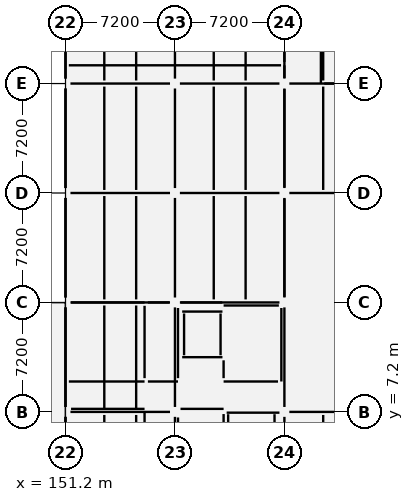
"""IFC4 building model, lengths in metres.
Left out: names, types, materials, properties, quantities, classifications, styles, units other than length and angle.
Written with IfcOpenShell. Run it as: python <this file> out.ifc"""

import sys

from ifc_helpers import new_model, si_unit, direction, frame, frame_2d, origin, origin_2d, place, context, subcontext, project, spatial, rectangle, extrude, element, fill, save


model = new_model("IFC4")
c1 = context("Model", 3, precision=1e-05, world=origin(), true_north=direction((0.0, 1.0)))
c2 = subcontext(c1, "Body", "Model", "MODEL_VIEW")
j1 = project(units=[si_unit("LENGTHUNIT", "METRE"), si_unit("PLANEANGLEUNIT", "RADIAN")], contexts=[c1])
p1 = place(None, origin())
s1 = spatial("IfcSite", under=j1, at=p1, CompositionType="ELEMENT")
p2 = place(p1, origin())
s2 = spatial("IfcBuilding", under=s1, at=p2, CompositionType="ELEMENT")
p3 = place(p2, frame((0.0, 0.0, 13.5)))
s3 = spatial("IfcBuildingStorey", under=s2, at=p3, CompositionType="ELEMENT", Elevation=13.5)
for number, where, z_axis, x_axis in (
    (1, (151.2, 7.2, 0.0), (0.0, 0.0, 1.0), (1.0, 0.0, 0.0)),
    (2, (151.2, 14.4, 0.0), (0.0, 0.0, 1.0), (1.0, 0.0, 0.0)),
    (3, (151.2, 21.6, 0.0), (0.0, 0.0, 1.0), (1.0, 0.0, 0.0)),
    (4, (151.2, 28.8, 0.0), (0.0, 0.0, 1.0), (1.0, 0.0, 0.0)),
    (5, (158.4, 7.2, 0.0), (0.0, 0.0, 1.0), (1.0, 0.0, 0.0)),
    (6, (158.4, 14.4, 0.0), (0.0, 0.0, 1.0), (1.0, 0.0, 0.0)),
    (7, (158.4, 21.6, 0.0), (0.0, 0.0, 1.0), (1.0, 0.0, 0.0)),
    (8, (158.4, 28.8, 0.0), (0.0, 0.0, 1.0), (1.0, 0.0, 0.0)),
    (9, (165.6, 7.2, 0.0), (0.0, 0.0, 1.0), (1.0, 0.0, 0.0)),
    (10, (165.6, 14.4, 0.0), (0.0, 0.0, 1.0), (1.0, 0.0, 0.0)),
    (11, (165.6, 21.6, 0.0), (0.0, 0.0, 1.0), (1.0, 0.0, 0.0)),
    (12, (165.6, 28.8, 0.0), (0.0, 0.0, 1.0), (1.0, 0.0, 0.0)),
):
    element("IfcColumn", number, at=place(p3, frame(where, z_axis=z_axis, x_axis=x_axis)), inside=s3, PredefinedType="COLUMN", context=c2, shape_type="SweptSolid", body=[
        extrude(rectangle(XDim=0.65, YDim=0.65, at=origin_2d()), origin(), (0.0, 0.0, 1.0), 3.9),
    ])
for number, where, z_axis, x_axis in (
    (13, (158.875, 10.8, 0.0), (0.0, 0.0, 1.0), (1.0, 0.0, 0.0)),
    (14, (158.875, 13.8, 0.0), (0.0, 0.0, 1.0), (1.0, 0.0, 0.0)),
):
    element("IfcWall", number, at=place(p3, frame(where, z_axis=z_axis, x_axis=x_axis)), inside=s3, PredefinedType="SHEAR", context=c2, shape_type="SweptSolid", body=[
        extrude(rectangle(XDim=2.65, YDim=0.25, at=frame_2d((1.325, 0.0))), origin(), (0.0, 0.0, 1.0), 3.62),
    ])
p4 = place(p3, frame((159.0, 10.925, 0.0), z_axis=(0.0, 0.0, 1.0), x_axis=(0.0, 1.0, 0.0)))
e15 = element("IfcWall", 15, at=p4, inside=s3, PredefinedType="SHEAR", context=c2, shape_type="SweptSolid", body=[
    extrude(rectangle(XDim=2.75, YDim=0.25, at=frame_2d((1.375, 0.0))), origin(), (0.0, 0.0, 1.0), 3.62),
])
p5 = place(p3, frame((161.4, 10.925, 0.0), z_axis=(0.0, 0.0, 1.0), x_axis=(0.0, 1.0, 0.0)))
e16 = element("IfcWall", 16, at=p5, inside=s3, PredefinedType="SHEAR", context=c2, shape_type="SweptSolid", body=[
    extrude(rectangle(XDim=2.75, YDim=0.25, at=frame_2d((1.375, 0.0))), origin(), (0.0, 0.0, 1.0), 3.62),
])
p6 = place(p5, frame((0.825, 0.0, 0.0)))
e17 = element("IfcOpeningElement", 17, at=p6, cuts=e16, PredefinedType="OPENING", context=c2, shape_type="SweptSolid", body=[
    extrude(rectangle(XDim=1.1, YDim=2.15, at=frame_2d((0.55, 1.075))), frame((0.0, 0.137, 0.0), z_axis=(0.0, -1.0, 0.0), x_axis=(1.0, 0.0, 0.0)), (0.0, 0.0, 1.0), 0.274),
])
p7 = place(p3, frame((161.8, 7.15, 0.0), z_axis=(0.0, 0.0, 1.0), x_axis=(1.0, 0.0, 0.0)))
e18 = element("IfcWall", 18, at=p7, inside=s3, PredefinedType="SHEAR", context=c2, shape_type="SweptSolid", body=[
    extrude(rectangle(XDim=3.475, YDim=0.2, at=frame_2d((1.737, 0.0))), origin(), (0.0, 0.0, 1.0), 3.62),
])
p8 = place(p7, frame((1.188, 0.0, 0.0)))
e19 = element("IfcOpeningElement", 19, at=p8, cuts=e18, PredefinedType="OPENING", context=c2, shape_type="SweptSolid", body=[
    extrude(rectangle(XDim=1.1, YDim=2.15, at=frame_2d((0.55, 1.075))), frame((0.0, 0.112, 0.0), z_axis=(0.0, -1.0, 0.0), x_axis=(1.0, 0.0, 0.0)), (0.0, 0.0, 1.0), 0.224),
])
for number, where, z_axis, x_axis in (
    (20, (161.9, 0.43, 0.0), (0.0, 0.0, 1.0), (0.0, 1.0, 0.0)),
    (21, (164.95, 0.43, 0.0), (0.0, 0.0, 1.0), (0.0, 1.0, 0.0)),
):
    element("IfcWall", number, at=place(p3, frame(where, z_axis=z_axis, x_axis=x_axis)), inside=s3, PredefinedType="SHEAR", context=c2, shape_type="SweptSolid", body=[
        extrude(rectangle(XDim=6.62, YDim=0.2, at=frame_2d((3.31, 0.0))), origin(), (0.0, 0.0, 1.0), 3.62),
    ])
p9 = place(p3, frame((151.2, 35.675, 0.0), z_axis=(0.0, 0.0, 1.0), x_axis=(0.0, -1.0, 0.0)))
e22 = element("IfcWall", 22, at=p9, inside=s3, PredefinedType="ELEMENTEDWALL", context=c2, shape_type="SweptSolid", body=[
    extrude(rectangle(XDim=6.55, YDim=0.28, at=frame_2d((3.275, 0.0))), origin(), (0.0, 0.0, 1.0), 2.96),
])
p10 = place(p3, frame((151.2, 28.475, 0.0), z_axis=(0.0, 0.0, 1.0), x_axis=(0.0, -1.0, 0.0)))
e23 = element("IfcWall", 23, at=p10, inside=s3, PredefinedType="ELEMENTEDWALL", context=c2, shape_type="SweptSolid", body=[
    extrude(rectangle(XDim=6.55, YDim=0.28, at=frame_2d((3.275, 0.0))), origin(), (0.0, 0.0, 1.0), 3.01),
])
p11 = place(p3, frame((151.2, 21.275, 0.0), z_axis=(0.0, 0.0, 1.0), x_axis=(0.0, -1.0, 0.0)))
e24 = element("IfcWall", 24, at=p11, inside=s3, PredefinedType="ELEMENTEDWALL", context=c2, shape_type="SweptSolid", body=[
    extrude(rectangle(XDim=6.55, YDim=0.28, at=frame_2d((3.275, 0.0))), origin(), (0.0, 0.0, 1.0), 2.96),
])
p12 = place(p3, frame((151.2, 14.075, 0.0), z_axis=(0.0, 0.0, 1.0), x_axis=(0.0, -1.0, 0.0)))
e25 = element("IfcWall", 25, at=p12, inside=s3, PredefinedType="ELEMENTEDWALL", context=c2, shape_type="SweptSolid", body=[
    extrude(rectangle(XDim=6.55, YDim=0.28, at=frame_2d((3.275, 0.0))), origin(), (0.0, 0.0, 1.0), 3.01),
])
p13 = place(p12, frame((2.525, 0.0, 0.0)))
e26 = element("IfcOpeningElement", 26, at=p13, cuts=e25, PredefinedType="OPENING", context=c2, shape_type="SweptSolid", body=[
    extrude(rectangle(XDim=1.5, YDim=2.2, at=frame_2d((0.75, 1.1))), frame((0.0, 0.152, 0.0), z_axis=(0.0, -1.0, 0.0), x_axis=(1.0, 0.0, 0.0)), (0.0, 0.0, 1.0), 0.304),
])
p14 = place(p3, frame((151.2, 6.875, 0.0), z_axis=(0.0, 0.0, 1.0), x_axis=(0.0, -1.0, 0.0)))
e27 = element("IfcWall", 27, at=p14, inside=s3, PredefinedType="ELEMENTEDWALL", context=c2, shape_type="SweptSolid", body=[
    extrude(rectangle(XDim=6.55, YDim=0.28, at=frame_2d((3.275, 0.0))), origin(), (0.0, 0.0, 1.0), 2.96),
])
p15 = place(p14, frame((2.575, 0.0, 0.85)))
e28 = element("IfcOpeningElement", 28, at=p15, cuts=e27, PredefinedType="OPENING", context=c2, shape_type="SweptSolid", body=[
    extrude(rectangle(XDim=1.4, YDim=1.65, at=frame_2d((0.7, 0.825))), frame((0.0, 0.152, 0.0), z_axis=(0.0, -1.0, 0.0), x_axis=(1.0, 0.0, 0.0)), (0.0, 0.0, 1.0), 0.304),
])
p16 = place(p3, frame((165.4, 9.2, 0.0), z_axis=(0.0, 0.0, 1.0), x_axis=(0.0, 1.0, 0.0)))
e29 = element("IfcWall", 29, at=p16, inside=s3, PredefinedType="STANDARD", context=c2, shape_type="SweptSolid", body=[
    extrude(rectangle(XDim=4.835, YDim=0.22, at=frame_2d((2.417, 0.0))), origin(), (0.0, 0.0, 1.0), 3.008),
])
p17 = place(p16, frame((1.817, 0.0, 0.0)))
e30 = element("IfcOpeningElement", 30, at=p17, cuts=e29, PredefinedType="OPENING", context=c2, shape_type="SweptSolid", body=[
    extrude(rectangle(XDim=1.2, YDim=2.2, at=frame_2d((0.6, 1.1))), frame((0.0, 0.122, 0.0), z_axis=(0.0, -1.0, 0.0), x_axis=(1.0, 0.0, 0.0)), (0.0, 0.0, 1.0), 0.244),
])
p18 = place(p3, frame((161.6, 9.2, 0.0), z_axis=(0.0, 0.0, 1.0), x_axis=(1.0, 0.0, 0.0)))
e31 = element("IfcWall", 31, at=p18, inside=s3, PredefinedType="STANDARD", context=c2, shape_type="SweptSolid", body=[
    extrude(rectangle(XDim=3.58, YDim=0.22, at=frame_2d((1.79, 0.0))), origin(), (0.0, 0.0, 1.0), 3.612),
])
p19 = place(p3, frame((161.6, 14.2, 0.0), z_axis=(0.0, 0.0, 1.0), x_axis=(1.0, 0.0, 0.0)))
e32 = element("IfcWall", 32, at=p19, inside=s3, PredefinedType="STANDARD", context=c2, shape_type="SweptSolid", body=[
    extrude(rectangle(XDim=3.635, YDim=0.22, at=frame_2d((1.817, 0.0))), origin(), (0.0, 0.0, 1.0), 2.908),
])
p20 = place(p3, frame((161.6, 9.42, 0.0), z_axis=(0.0, 0.0, 1.0), x_axis=(0.0, 1.0, 0.0)))
e33 = element("IfcWall", 33, at=p20, inside=s3, PredefinedType="STANDARD", context=c2, shape_type="SweptSolid", body=[
    extrude(rectangle(XDim=1.174, YDim=0.22, at=frame_2d((0.587, 0.0))), origin(), (0.0, 0.0, 1.0), 3.612),
])
p21 = place(p3, frame((151.565, 7.4, 0.0), z_axis=(0.0, 0.0, 1.0), x_axis=(1.0, 0.0, 0.0)))
e34 = element("IfcWall", 34, at=p21, inside=s3, PredefinedType="PARTITIONING", context=c2, shape_type="SweptSolid", body=[
    extrude(rectangle(XDim=4.835, YDim=0.14, at=frame_2d((2.417, 0.0))), origin(), (0.0, 0.0, 1.0), 2.858),
])
p22 = place(p21, frame((1.942, 0.0, 0.0)))
e35 = element("IfcOpeningElement", 35, at=p22, cuts=e34, PredefinedType="OPENING", context=c2, shape_type="SweptSolid", body=[
    extrude(rectangle(XDim=0.95, YDim=2.1, at=frame_2d((0.475, 1.05))), frame((0.0, 0.082, 0.0), z_axis=(0.0, -1.0, 0.0), x_axis=(1.0, 0.0, 0.0)), (0.0, 0.0, 1.0), 0.164),
])
p23 = place(p3, frame((156.4, 0.22, 0.0), z_axis=(0.0, 0.0, 1.0), x_axis=(0.0, 1.0, 0.0)))
e36 = element("IfcWall", 36, at=p23, inside=s3, PredefinedType="PARTITIONING", context=c2, shape_type="SweptSolid", body=[
    extrude(rectangle(XDim=6.96, YDim=0.14, at=frame_2d((3.48, 0.0))), origin(), (0.0, 0.0, 1.0), 2.858),
])
p24 = place(p23, frame((3.04, 0.0, 0.0)))
e37 = element("IfcOpeningElement", 37, at=p24, cuts=e36, PredefinedType="OPENING", context=c2, shape_type="SweptSolid", body=[
    extrude(rectangle(XDim=0.88, YDim=2.08, at=frame_2d((0.44, 1.04))), frame((0.0, 0.082, 0.0), z_axis=(0.0, -1.0, 0.0), x_axis=(1.0, 0.0, 0.0)), (0.0, 0.0, 1.0), 0.164),
])
p25 = place(p3, frame((158.765, 7.4, 0.0), z_axis=(0.0, 0.0, 1.0), x_axis=(1.0, 0.0, 0.0)))
e38 = element("IfcWall", 38, at=p25, inside=s3, PredefinedType="PARTITIONING", context=c2, shape_type="SweptSolid", body=[
    extrude(rectangle(XDim=2.835, YDim=0.14, at=frame_2d((1.417, 0.0))), origin(), (0.0, 0.0, 1.0), 3.612),
])
p26 = place(p25, frame((0.942, 0.0, 0.0)))
e39 = element("IfcOpeningElement", 39, at=p26, cuts=e38, PredefinedType="OPENING", context=c2, shape_type="SweptSolid", body=[
    extrude(rectangle(XDim=0.95, YDim=2.1, at=frame_2d((0.475, 1.05))), frame((0.0, 0.082, 0.0), z_axis=(0.0, -1.0, 0.0), x_axis=(1.0, 0.0, 0.0)), (0.0, 0.0, 1.0), 0.164),
])
p27 = place(p3, frame((161.6, 0.421, 0.0), z_axis=(0.0, 0.0, 1.0), x_axis=(0.0, 1.0, 0.0)))
e40 = element("IfcWall", 40, at=p27, inside=s3, PredefinedType="PARTITIONING", context=c2, shape_type="SweptSolid", body=[
    extrude(rectangle(XDim=6.638, YDim=0.14, at=frame_2d((3.319, 0.0))), origin(), (0.0, 0.0, 1.0), 3.612),
])
p28 = place(p3, frame((158.6, 4.42, 0.0), z_axis=(0.0, 0.0, 1.0), x_axis=(0.0, 1.0, 0.0)))
e41 = element("IfcWall", 41, at=p28, inside=s3, PredefinedType="PARTITIONING", context=c2, shape_type="SweptSolid", body=[
    extrude(rectangle(XDim=2.415, YDim=0.14, at=frame_2d((1.208, 0.0))), origin(), (0.0, 0.0, 1.0), 2.958),
])
p29 = place(p3, frame((151.42, 9.2, 0.0), z_axis=(0.0, 0.0, 1.0), x_axis=(1.0, 0.0, 0.0)))
e42 = element("IfcWall", 42, at=p29, inside=s3, PredefinedType="PARTITIONING", context=c2, shape_type="SweptSolid", body=[
    extrude(rectangle(XDim=4.98, YDim=0.14, at=frame_2d((2.49, 0.0))), origin(), (0.0, 0.0, 1.0), 3.058),
])
p30 = place(p29, frame((2.015, 0.0, 0.0)))
e43 = element("IfcOpeningElement", 43, at=p30, cuts=e42, PredefinedType="OPENING", context=c2, shape_type="SweptSolid", body=[
    extrude(rectangle(XDim=0.95, YDim=2.1, at=frame_2d((0.475, 1.05))), frame((0.0, 0.082, 0.0), z_axis=(0.0, -1.0, 0.0), x_axis=(1.0, 0.0, 0.0)), (0.0, 0.0, 1.0), 0.164),
])
p31 = place(p3, frame((151.565, 14.4, 0.0), z_axis=(0.0, 0.0, 1.0), x_axis=(1.0, 0.0, 0.0)))
e44 = element("IfcWall", 44, at=p31, inside=s3, PredefinedType="PARTITIONING", context=c2, shape_type="SweptSolid", body=[
    extrude(rectangle(XDim=4.835, YDim=0.14, at=frame_2d((2.417, 0.0))), origin(), (0.0, 0.0, 1.0), 2.858),
])
p32 = place(p3, frame((156.4, 9.42, 0.0), z_axis=(0.0, 0.0, 1.0), x_axis=(0.0, 1.0, 0.0)))
e45 = element("IfcWall", 45, at=p32, inside=s3, PredefinedType="PARTITIONING", context=c2, shape_type="SweptSolid", body=[
    extrude(rectangle(XDim=4.76, YDim=0.14, at=frame_2d((2.38, 0.0))), origin(), (0.0, 0.0, 1.0), 2.858),
])
p33 = place(p32, frame((1.94, 0.0, 0.0)))
e46 = element("IfcOpeningElement", 46, at=p33, cuts=e45, PredefinedType="OPENING", context=c2, shape_type="SweptSolid", body=[
    extrude(rectangle(XDim=0.88, YDim=2.08, at=frame_2d((0.44, 1.04))), frame((0.0, 0.082, 0.0), z_axis=(0.0, -1.0, 0.0), x_axis=(1.0, 0.0, 0.0)), (0.0, 0.0, 1.0), 0.164),
])
p34 = place(p3, frame((156.62, 9.2, 0.0), z_axis=(0.0, 0.0, 1.0), x_axis=(1.0, 0.0, 0.0)))
e47 = element("IfcWall", 47, at=p34, inside=s3, PredefinedType="PLUMBINGWALL", context=c2, shape_type="SweptSolid", body=[
    extrude(rectangle(XDim=1.98, YDim=0.18, at=frame_2d((0.99, 0.0))), origin(), (0.0, 0.0, 1.0), 3.008),
])
p35 = place(p3, frame((156.62, 14.4, 0.0), z_axis=(0.0, 0.0, 1.0), x_axis=(1.0, 0.0, 0.0)))
e48 = element("IfcWall", 48, at=p35, inside=s3, PredefinedType="PLUMBINGWALL", context=c2, shape_type="SweptSolid", body=[
    extrude(rectangle(XDim=1.415, YDim=0.18, at=frame_2d((0.708, 0.0))), origin(), (0.0, 0.0, 1.0), 2.858),
])
p36 = place(p3, frame((158.6, 9.42, 0.0), z_axis=(0.0, 0.0, 1.0), x_axis=(0.0, 1.0, 0.0)))
e49 = element("IfcWall", 49, at=p36, inside=s3, PredefinedType="PLUMBINGWALL", context=c2, shape_type="SweptSolid", body=[
    extrude(rectangle(XDim=4.615, YDim=0.18, at=frame_2d((2.308, 0.0))), origin(), (0.0, 0.0, 1.0), 3.008),
])
p37 = place(p3, frame((165.6, 14.765, 0.0), z_axis=(0.0, 0.0, 1.0), x_axis=(0.0, 1.0, 0.0)))
e50 = element("IfcWall", 50, at=p37, inside=s3, PredefinedType="PARTITIONING", context=c2, shape_type="SweptSolid", body=[
    extrude(rectangle(XDim=6.47, YDim=0.1, at=frame_2d((3.235, 0.0))), origin(), (0.0, 0.0, 1.0), 2.958),
])
p38 = place(p37, frame((2.61, 0.0, 0.0)))
e51 = element("IfcOpeningElement", 51, at=p38, cuts=e50, PredefinedType="OPENING", context=c2, shape_type="SweptSolid", body=[
    extrude(rectangle(XDim=1.25, YDim=2.15, at=frame_2d((0.625, 1.075))), frame((0.0, 0.062, 0.0), z_axis=(0.0, -1.0, 0.0), x_axis=(1.0, 0.0, 0.0)), (0.0, 0.0, 1.0), 0.124),
])
p39 = place(p3, frame((165.6, 21.965, 0.0), z_axis=(0.0, 0.0, 1.0), x_axis=(0.0, 1.0, 0.0)))
e52 = element("IfcWall", 52, at=p39, inside=s3, PredefinedType="PARTITIONING", context=c2, shape_type="SweptSolid", body=[
    extrude(rectangle(XDim=6.47, YDim=0.1, at=frame_2d((3.235, 0.0))), origin(), (0.0, 0.0, 1.0), 3.008),
])
p40 = place(p3, frame((165.6, 29.165, 0.0), z_axis=(0.0, 0.0, 1.0), x_axis=(0.0, 1.0, 0.0)))
e53 = element("IfcWall", 53, at=p40, inside=s3, PredefinedType="PARTITIONING", context=c2, shape_type="SweptSolid", body=[
    extrude(rectangle(XDim=0.835, YDim=0.1, at=frame_2d((0.417, 0.0))), origin(), (0.0, 0.0, 1.0), 2.958),
])
p41 = place(p3, frame((158.765, 14.4, 0.0), z_axis=(0.0, 0.0, 1.0), x_axis=(1.0, 0.0, 0.0)))
e54 = element("IfcWall", 54, at=p41, inside=s3, PredefinedType="PARTITIONING", context=c2, shape_type="SweptSolid", body=[
    extrude(rectangle(XDim=2.744, YDim=0.1, at=frame_2d((1.372, 0.0))), origin(), (0.0, 0.0, 1.0), 2.908),
])
p42 = place(p3, frame((151.42, 30.0, 0.0), z_axis=(0.0, 0.0, 1.0), x_axis=(1.0, 0.0, 0.0)))
e55 = element("IfcWall", 55, at=p42, inside=s3, PredefinedType="PARTITIONING", context=c2, shape_type="SweptSolid", body=[
    extrude(rectangle(XDim=13.96, YDim=0.1, at=frame_2d((6.98, 0.0))), origin(), (0.0, 0.0, 1.0), 2.958),
])
p43 = place(p3, frame((165.6, 30.22, 0.0), z_axis=(0.0, 0.0, 1.0), x_axis=(0.0, 1.0, 0.0)))
e56 = element("IfcWall", 56, at=p43, inside=s3, PredefinedType="PARTITIONING", context=c2, shape_type="SweptSolid", body=[
    extrude(rectangle(XDim=5.415, YDim=0.12, at=frame_2d((2.708, 0.0))), origin(), (0.0, 0.0, 1.0), 2.958),
])
p44 = place(p43, frame((2.208, 0.0, 0.0)))
e57 = element("IfcOpeningElement", 57, at=p44, cuts=e56, PredefinedType="OPENING", context=c2, shape_type="SweptSolid", body=[
    extrude(rectangle(XDim=1.0, YDim=2.15, at=frame_2d((0.5, 1.075))), frame((0.0, 0.072, 0.0), z_axis=(0.0, -1.0, 0.0), x_axis=(1.0, 0.0, 0.0)), (0.0, 0.0, 1.0), 0.144),
])
p45 = place(p3, frame((168.0, 28.8, 0.0), z_axis=(0.0, 0.0, 1.0), x_axis=(0.0, 1.0, 0.0)))
e58 = element("IfcWall", 58, at=p45, inside=s3, PredefinedType="PLUMBINGWALL", context=c2, shape_type="SweptSolid", body=[
    extrude(rectangle(XDim=14.18, YDim=0.18, at=frame_2d((7.09, 0.0))), origin(), (0.0, 0.0, 1.0), 2.858),
])
p46 = place(p45, frame((6.64, 0.0, 0.0)))
e59 = element("IfcOpeningElement", 59, at=p46, cuts=e58, PredefinedType="OPENING", context=c2, shape_type="SweptSolid", body=[
    extrude(rectangle(XDim=0.9, YDim=2.1, at=frame_2d((0.45, 1.05))), frame((0.0, 0.102, 0.0), z_axis=(0.0, -1.0, 0.0), x_axis=(1.0, 0.0, 0.0)), (0.0, 0.0, 1.0), 0.204),
])
p47 = place(p3, frame((168.22, 28.8, 0.0), z_axis=(0.0, 0.0, 1.0), x_axis=(1.0, 0.0, 0.0)))
e60 = element("IfcWall", 60, at=p47, inside=s3, PredefinedType="PLUMBINGWALL", context=c2, shape_type="SweptSolid", body=[
    extrude(rectangle(XDim=4.215, YDim=0.18, at=frame_2d((2.107, 0.0))), origin(), (0.0, 0.0, 1.0), 2.908),
])
p48 = place(p13, frame((1.5, 0.0, 0.0), z_axis=(0.0, 0.0, 1.0), x_axis=(-1.0, 0.0, 0.0)))
e61 = element("IfcDoor", 61, at=p48, inside=s3, OperationType="DOUBLE_SWING_LEFT", PredefinedType="DOOR", context=c2, shape_type="SweptSolid", body=[
    extrude(rectangle(XDim=1.5, YDim=2.2, at=frame_2d((0.75, 1.1))), frame((0.0, 0.025, 0.0), z_axis=(0.0, -1.0, 0.0), x_axis=(1.0, 0.0, 0.0)), (0.0, 0.0, 1.0), 0.05),
])
fill(e26, e61)
p49 = place(p8, frame((1.1, 0.0, 0.0), z_axis=(0.0, 0.0, 1.0), x_axis=(-1.0, 0.0, 0.0)))
e62 = element("IfcDoor", 62, at=p49, inside=s3, OperationType="SINGLE_SWING_RIGHT", PredefinedType="DOOR", context=c2, shape_type="SweptSolid", body=[
    extrude(rectangle(XDim=1.1, YDim=2.15, at=frame_2d((0.55, 1.075))), frame((0.0, 0.025, 0.0), z_axis=(0.0, -1.0, 0.0), x_axis=(1.0, 0.0, 0.0)), (0.0, 0.0, 1.0), 0.05),
])
fill(e19, e62)
p50 = place(p6, origin())
e63 = element("IfcDoor", 63, at=p50, inside=s3, OperationType="SLIDING_TO_LEFT", PredefinedType="DOOR", context=c2, shape_type="SweptSolid", body=[
    extrude(rectangle(XDim=1.1, YDim=2.15, at=frame_2d((0.55, 1.075))), frame((0.0, 0.025, 0.0), z_axis=(0.0, -1.0, 0.0), x_axis=(1.0, 0.0, 0.0)), (0.0, 0.0, 1.0), 0.05),
])
fill(e17, e63)
p51 = place(p17, origin())
e64 = element("IfcDoor", 64, at=p51, inside=s3, OperationType="SINGLE_SWING_LEFT", PredefinedType="DOOR", context=c2, shape_type="SweptSolid", body=[
    extrude(rectangle(XDim=1.2, YDim=2.2, at=frame_2d((0.6, 1.1))), frame((0.0, 0.025, 0.0), z_axis=(0.0, -1.0, 0.0), x_axis=(1.0, 0.0, 0.0)), (0.0, 0.0, 1.0), 0.05),
])
fill(e30, e64)
p52 = place(p22, origin())
e65 = element("IfcDoor", 65, at=p52, inside=s3, OperationType="SINGLE_SWING_RIGHT", PredefinedType="DOOR", context=c2, shape_type="SweptSolid", body=[
    extrude(rectangle(XDim=0.95, YDim=2.1, at=frame_2d((0.475, 1.05))), frame((0.0, 0.025, 0.0), z_axis=(0.0, -1.0, 0.0), x_axis=(1.0, 0.0, 0.0)), (0.0, 0.0, 1.0), 0.05),
])
fill(e35, e65)
p53 = place(p26, origin())
e66 = element("IfcDoor", 66, at=p53, inside=s3, OperationType="SINGLE_SWING_RIGHT", PredefinedType="DOOR", context=c2, shape_type="SweptSolid", body=[
    extrude(rectangle(XDim=0.95, YDim=2.1, at=frame_2d((0.475, 1.05))), frame((0.0, 0.025, 0.0), z_axis=(0.0, -1.0, 0.0), x_axis=(1.0, 0.0, 0.0)), (0.0, 0.0, 1.0), 0.05),
])
fill(e39, e66)
p54 = place(p30, origin())
e67 = element("IfcDoor", 67, at=p54, inside=s3, OperationType="SINGLE_SWING_LEFT", PredefinedType="DOOR", context=c2, shape_type="SweptSolid", body=[
    extrude(rectangle(XDim=0.95, YDim=2.1, at=frame_2d((0.475, 1.05))), frame((0.0, 0.025, 0.0), z_axis=(0.0, -1.0, 0.0), x_axis=(1.0, 0.0, 0.0)), (0.0, 0.0, 1.0), 0.05),
])
fill(e43, e67)
p55 = place(p33, origin())
e68 = element("IfcDoor", 68, at=p55, inside=s3, OperationType="SINGLE_SWING_RIGHT", PredefinedType="DOOR", context=c2, shape_type="SweptSolid", body=[
    extrude(rectangle(XDim=0.88, YDim=2.08, at=frame_2d((0.44, 1.04))), frame((0.0, 0.025, 0.0), z_axis=(0.0, -1.0, 0.0), x_axis=(1.0, 0.0, 0.0)), (0.0, 0.0, 1.0), 0.05),
])
fill(e46, e68)
p56 = place(p38, origin())
e69 = element("IfcDoor", 69, at=p56, inside=s3, OperationType="SINGLE_SWING_LEFT", PredefinedType="DOOR", context=c2, shape_type="SweptSolid", body=[
    extrude(rectangle(XDim=1.25, YDim=2.15, at=frame_2d((0.625, 1.075))), frame((0.0, 0.025, 0.0), z_axis=(0.0, -1.0, 0.0), x_axis=(1.0, 0.0, 0.0)), (0.0, 0.0, 1.0), 0.05),
])
fill(e51, e69)
save(model, sys.argv[1])
